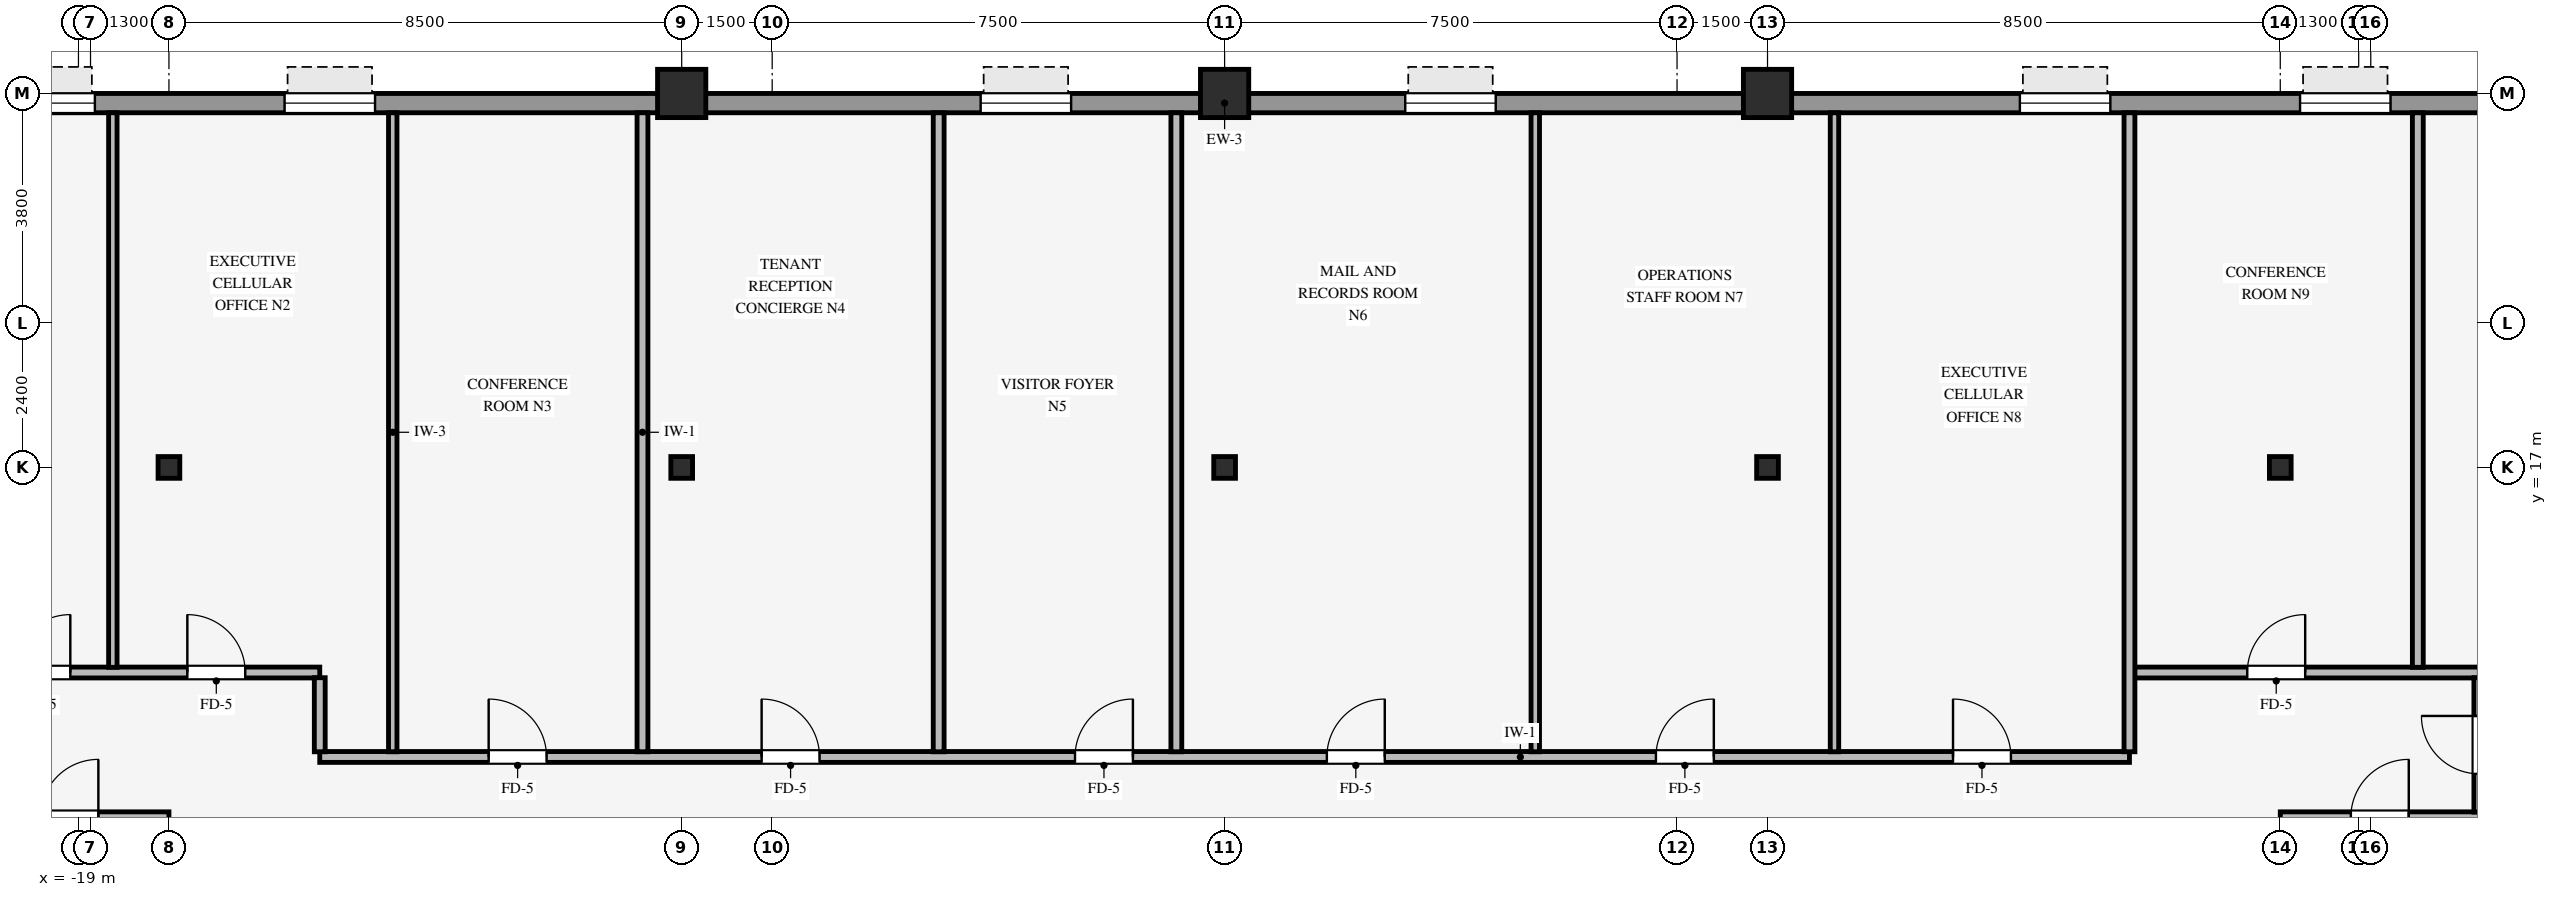
"""IFC4 building model, lengths in metres.
Left out: names, types, materials, properties, quantities, classifications, styles, units other than length and angle.
Written with IfcOpenShell. Run it as: python <this file> out.ifc"""

import sys

from ifc_helpers import new_model, si_unit, direction, frame, frame_2d, origin, origin_2d, place, context, subcontext, project, spatial, rectangle, hollow_rectangle, i_section, extrude, source, transform, mapped, element, fill, save


model = new_model("IFC4")
c1 = context("Model", 3, precision=1e-05, world=origin(), true_north=direction((0.0, 1.0)))
c2 = subcontext(c1, "Body", "Model", "MODEL_VIEW")
j1 = project(units=[si_unit("LENGTHUNIT", "METRE"), si_unit("PLANEANGLEUNIT", "RADIAN")], contexts=[c1])
p1 = place(None, origin())
s1 = spatial("IfcSite", under=j1, at=p1, CompositionType="ELEMENT")
p2 = place(p1, origin())
s2 = spatial("IfcBuilding", under=s1, at=p2, CompositionType="ELEMENT")
p3 = place(p2, frame((0.0, 0.0, 89.65)))
s3 = spatial("IfcBuildingStorey", under=s2, at=p3, CompositionType="ELEMENT", Elevation=89.65)
for number, where, z_axis, x_axis in (
    (1, (-9.0, 23.2, 0.0), (0.0, 0.0, 1.0), (1.0, 0.0, 0.0)),
    (2, (0.0, 23.2, 0.0), (0.0, 0.0, 1.0), (1.0, 0.0, 0.0)),
    (3, (9.0, 23.2, 0.0), (0.0, 0.0, 1.0), (1.0, 0.0, 0.0)),
):
    element("IfcColumn", number, at=place(p3, frame(where, z_axis=z_axis, x_axis=x_axis)), inside=s3, PredefinedType="COLUMN", context=c2, shape_type="SweptSolid", body=[
        extrude(hollow_rectangle(XDim=0.8, YDim=0.8, WallThickness=0.055, InnerFilletRadius=0.055, OuterFilletRadius=0.11, at=origin_2d()), origin(), (0.0, 0.0, 1.0), 3.25),
    ])
for number, where, z_axis, x_axis in (
    (4, (0.0, 17.0, 0.0), (0.0, 0.0, 1.0), (1.0, 0.0, 0.0)),
    (5, (-17.5, 17.0, 0.0), (0.0, 0.0, 1.0), (1.0, 0.0, 0.0)),
    (6, (-9.0, 17.0, 0.0), (0.0, 0.0, 1.0), (1.0, 0.0, 0.0)),
    (7, (9.0, 17.0, 0.0), (0.0, 0.0, 1.0), (1.0, 0.0, 0.0)),
    (8, (17.5, 17.0, 0.0), (0.0, 0.0, 1.0), (1.0, 0.0, 0.0)),
):
    element("IfcColumn", number, at=place(p3, frame(where, z_axis=z_axis, x_axis=x_axis)), inside=s3, PredefinedType="COLUMN", context=c2, shape_type="SweptSolid", body=[
        extrude(i_section(OverallWidth=0.36, OverallDepth=0.36, WebThickness=0.021, FlangeThickness=0.021, FilletRadius=0.018, at=origin_2d()), origin(), (0.0, 0.0, 1.0), 3.25),
    ])
p4 = place(p3, frame((-21.9, 23.04, 0.0), z_axis=(0.0, 0.0, 1.0), x_axis=(1.0, 0.0, 0.0)))
e9 = element("IfcWall", 9, at=p4, inside=s3, PredefinedType="STANDARD", context=c2, shape_type="SweptSolid", body=[
    extrude(rectangle(XDim=43.8, YDim=0.32, at=frame_2d((21.9, 0.0))), origin(), (0.0, 0.0, 1.0), 2.585),
])
p5 = place(p4, frame((1.672, 0.0, 0.8)))
e10 = element("IfcOpeningElement", 10, at=p5, cuts=e9, PredefinedType="OPENING", context=c2, shape_type="SweptSolid", body=[
    extrude(rectangle(XDim=1.5, YDim=1.6, at=frame_2d((0.75, 0.8))), frame((0.0, 0.17, 0.0), z_axis=(0.0, -1.0, 0.0), x_axis=(1.0, 0.0, 0.0)), (0.0, 0.0, 1.0), 0.34),
])
p6 = place(p4, frame((6.317, 0.0, 0.8)))
e11 = element("IfcOpeningElement", 11, at=p6, cuts=e9, PredefinedType="OPENING", context=c2, shape_type="SweptSolid", body=[
    extrude(rectangle(XDim=1.5, YDim=1.6, at=frame_2d((0.75, 0.8))), frame((0.0, 0.17, 0.0), z_axis=(0.0, -1.0, 0.0), x_axis=(1.0, 0.0, 0.0)), (0.0, 0.0, 1.0), 0.34),
])
p7 = place(p4, frame((17.856, 0.0, 0.8)))
e12 = element("IfcOpeningElement", 12, at=p7, cuts=e9, PredefinedType="OPENING", context=c2, shape_type="SweptSolid", body=[
    extrude(rectangle(XDim=1.5, YDim=1.6, at=frame_2d((0.75, 0.8))), frame((0.0, 0.17, 0.0), z_axis=(0.0, -1.0, 0.0), x_axis=(1.0, 0.0, 0.0)), (0.0, 0.0, 1.0), 0.34),
])
p8 = place(p4, frame((24.894, 0.0, 0.8)))
e13 = element("IfcOpeningElement", 13, at=p8, cuts=e9, PredefinedType="OPENING", context=c2, shape_type="SweptSolid", body=[
    extrude(rectangle(XDim=1.5, YDim=1.6, at=frame_2d((0.75, 0.8))), frame((0.0, 0.17, 0.0), z_axis=(0.0, -1.0, 0.0), x_axis=(1.0, 0.0, 0.0)), (0.0, 0.0, 1.0), 0.34),
])
p9 = place(p4, frame((35.083, 0.0, 0.8)))
e14 = element("IfcOpeningElement", 14, at=p9, cuts=e9, PredefinedType="OPENING", context=c2, shape_type="SweptSolid", body=[
    extrude(rectangle(XDim=1.5, YDim=1.6, at=frame_2d((0.75, 0.8))), frame((0.0, 0.17, 0.0), z_axis=(0.0, -1.0, 0.0), x_axis=(1.0, 0.0, 0.0)), (0.0, 0.0, 1.0), 0.34),
])
p10 = place(p4, frame((39.728, 0.0, 0.8)))
e15 = element("IfcOpeningElement", 15, at=p10, cuts=e9, PredefinedType="OPENING", context=c2, shape_type="SweptSolid", body=[
    extrude(rectangle(XDim=1.5, YDim=1.6, at=frame_2d((0.75, 0.8))), frame((0.0, 0.17, 0.0), z_axis=(0.0, -1.0, 0.0), x_axis=(1.0, 0.0, 0.0)), (0.0, 0.0, 1.0), 0.34),
])
p11 = place(p3, frame((-23.68, 11.2, 0.0), z_axis=(0.0, 0.0, 1.0), x_axis=(1.0, 0.0, 0.0)))
e16 = element("IfcWall", 16, at=p11, inside=s3, PredefinedType="PARTITIONING", context=c2, shape_type="SweptSolid", body=[
    extrude(rectangle(XDim=6.18, YDim=0.18, at=frame_2d((3.09, 0.0))), origin(), (0.0, 0.0, 1.0), 3.24),
])
p12 = place(p11, frame((4.05, 0.0, 0.0)))
e17 = element("IfcOpeningElement", 17, at=p12, cuts=e16, PredefinedType="OPENING", context=c2, shape_type="SweptSolid", body=[
    extrude(rectangle(XDim=0.96, YDim=2.1, at=frame_2d((0.48, 1.05))), frame((0.0, 0.1, 0.0), z_axis=(0.0, -1.0, 0.0), x_axis=(1.0, 0.0, 0.0)), (0.0, 0.0, 1.0), 0.2),
])
p13 = place(p3, frame((17.5, 11.2, 0.0), z_axis=(0.0, 0.0, 1.0), x_axis=(1.0, 0.0, 0.0)))
e18 = element("IfcWall", 18, at=p13, inside=s3, PredefinedType="PARTITIONING", context=c2, shape_type="SweptSolid", body=[
    extrude(rectangle(XDim=6.18, YDim=0.18, at=frame_2d((3.09, 0.0))), origin(), (0.0, 0.0, 1.0), 3.24),
])
p14 = place(p13, frame((1.17, 0.0, 0.0)))
e19 = element("IfcOpeningElement", 19, at=p14, cuts=e18, PredefinedType="OPENING", context=c2, shape_type="SweptSolid", body=[
    extrude(rectangle(XDim=0.96, YDim=2.1, at=frame_2d((0.48, 1.05))), frame((0.0, 0.1, 0.0), z_axis=(0.0, -1.0, 0.0), x_axis=(1.0, 0.0, 0.0)), (0.0, 0.0, 1.0), 0.2),
])
p15 = place(p3, frame((-15.0, 12.2, 0.0), z_axis=(0.0, 0.0, 1.0), x_axis=(1.0, 0.0, 0.0)))
e20 = element("IfcWall", 20, at=p15, inside=s3, PredefinedType="PARTITIONING", context=c2, shape_type="SweptSolid", body=[
    extrude(rectangle(XDim=30.0, YDim=0.18, at=frame_2d((15.0, 0.0))), origin(), (0.0, 0.0, 1.0), 3.24),
])
p16 = place(p15, frame((16.695, 0.0, 0.0)))
e21 = element("IfcOpeningElement", 21, at=p16, cuts=e20, PredefinedType="OPENING", context=c2, shape_type="SweptSolid", body=[
    extrude(rectangle(XDim=0.96, YDim=2.1, at=frame_2d((0.48, 1.05))), frame((0.0, 0.1, 0.0), z_axis=(0.0, -1.0, 0.0), x_axis=(1.0, 0.0, 0.0)), (0.0, 0.0, 1.0), 0.2),
])
p17 = place(p15, frame((22.15, 0.0, 0.0)))
e22 = element("IfcOpeningElement", 22, at=p17, cuts=e20, PredefinedType="OPENING", context=c2, shape_type="SweptSolid", body=[
    extrude(rectangle(XDim=0.96, YDim=2.1, at=frame_2d((0.48, 1.05))), frame((0.0, 0.1, 0.0), z_axis=(0.0, -1.0, 0.0), x_axis=(1.0, 0.0, 0.0)), (0.0, 0.0, 1.0), 0.2),
])
p18 = place(p15, frame((7.325, 0.0, 0.0)))
e23 = element("IfcOpeningElement", 23, at=p18, cuts=e20, PredefinedType="OPENING", context=c2, shape_type="SweptSolid", body=[
    extrude(rectangle(XDim=0.96, YDim=2.1, at=frame_2d((0.48, 1.05))), frame((0.0, 0.1, 0.0), z_axis=(0.0, -1.0, 0.0), x_axis=(1.0, 0.0, 0.0)), (0.0, 0.0, 1.0), 0.2),
])
p19 = place(p15, frame((27.075, 0.0, 0.0)))
e24 = element("IfcOpeningElement", 24, at=p19, cuts=e20, PredefinedType="OPENING", context=c2, shape_type="SweptSolid", body=[
    extrude(rectangle(XDim=0.96, YDim=2.1, at=frame_2d((0.48, 1.05))), frame((0.0, 0.1, 0.0), z_axis=(0.0, -1.0, 0.0), x_axis=(1.0, 0.0, 0.0)), (0.0, 0.0, 1.0), 0.2),
])
p20 = place(p15, frame((2.8, 0.0, 0.0)))
e25 = element("IfcOpeningElement", 25, at=p20, cuts=e20, PredefinedType="OPENING", context=c2, shape_type="SweptSolid", body=[
    extrude(rectangle(XDim=0.96, YDim=2.1, at=frame_2d((0.48, 1.05))), frame((0.0, 0.1, 0.0), z_axis=(0.0, -1.0, 0.0), x_axis=(1.0, 0.0, 0.0)), (0.0, 0.0, 1.0), 0.2),
])
p21 = place(p15, frame((12.52, 0.0, 0.0)))
e26 = element("IfcOpeningElement", 26, at=p21, cuts=e20, PredefinedType="OPENING", context=c2, shape_type="SweptSolid", body=[
    extrude(rectangle(XDim=0.96, YDim=2.1, at=frame_2d((0.48, 1.05))), frame((0.0, 0.1, 0.0), z_axis=(0.0, -1.0, 0.0), x_axis=(1.0, 0.0, 0.0)), (0.0, 0.0, 1.0), 0.2),
])
p22 = place(p3, frame((-20.8, 13.6, 0.0), z_axis=(0.0, 0.0, 1.0), x_axis=(1.0, 0.0, 0.0)))
e27 = element("IfcWall", 27, at=p22, inside=s3, PredefinedType="PARTITIONING", context=c2, shape_type="SweptSolid", body=[
    extrude(rectangle(XDim=5.8, YDim=0.18, at=frame_2d((2.9, 0.0))), origin(), (0.0, 0.0, 1.0), 2.878),
])
p23 = place(p22, frame((3.605, 0.0, 0.0)))
e28 = element("IfcOpeningElement", 28, at=p23, cuts=e27, PredefinedType="OPENING", context=c2, shape_type="SweptSolid", body=[
    extrude(rectangle(XDim=0.96, YDim=2.1, at=frame_2d((0.48, 1.05))), frame((0.0, 0.1, 0.0), z_axis=(0.0, -1.0, 0.0), x_axis=(1.0, 0.0, 0.0)), (0.0, 0.0, 1.0), 0.2),
])
p24 = place(p22, frame((0.705, 0.0, 0.0)))
e29 = element("IfcOpeningElement", 29, at=p24, cuts=e27, PredefinedType="OPENING", context=c2, shape_type="SweptSolid", body=[
    extrude(rectangle(XDim=0.96, YDim=2.1, at=frame_2d((0.48, 1.05))), frame((0.0, 0.1, 0.0), z_axis=(0.0, -1.0, 0.0), x_axis=(1.0, 0.0, 0.0)), (0.0, 0.0, 1.0), 0.2),
])
p25 = place(p3, frame((15.086, 13.6, 0.0), z_axis=(0.0, 0.0, 1.0), x_axis=(1.0, 0.0, 0.0)))
e30 = element("IfcWall", 30, at=p25, inside=s3, PredefinedType="PARTITIONING", context=c2, shape_type="SweptSolid", body=[
    extrude(rectangle(XDim=5.714, YDim=0.18, at=frame_2d((2.857, 0.0))), origin(), (0.0, 0.0, 1.0), 2.878),
])
p26 = place(p25, frame((1.867, 0.0, 0.0)))
e31 = element("IfcOpeningElement", 31, at=p26, cuts=e30, PredefinedType="OPENING", context=c2, shape_type="SweptSolid", body=[
    extrude(rectangle(XDim=0.96, YDim=2.1, at=frame_2d((0.48, 1.05))), frame((0.0, 0.1, 0.0), z_axis=(0.0, -1.0, 0.0), x_axis=(1.0, 0.0, 0.0)), (0.0, 0.0, 1.0), 0.2),
])
p27 = place(p3, frame((-18.43, 13.686, 0.0), z_axis=(0.0, 0.0, 1.0), x_axis=(0.0, 1.0, 0.0)))
e32 = element("IfcWall", 32, at=p27, inside=s3, PredefinedType="PARTITIONING", context=c2, shape_type="SweptSolid", body=[
    extrude(rectangle(XDim=9.194, YDim=0.14, at=frame_2d((4.597, 0.0))), origin(), (0.0, 0.0, 1.0), 3.24),
])
p28 = place(p3, frame((-15.0, 12.286, 0.0), z_axis=(0.0, 0.0, 1.0), x_axis=(0.0, 1.0, 0.0)))
e33 = element("IfcWall", 33, at=p28, inside=s3, PredefinedType="PARTITIONING", context=c2, shape_type="SweptSolid", body=[
    extrude(rectangle(XDim=1.228, YDim=0.18, at=frame_2d((0.614, 0.0))), origin(), (0.0, 0.0, 1.0), 3.24),
])
p29 = place(p3, frame((-13.79, 12.286, 0.0), z_axis=(0.0, 0.0, 1.0), x_axis=(0.0, 1.0, 0.0)))
e34 = element("IfcWall", 34, at=p29, inside=s3, PredefinedType="PARTITIONING", context=c2, shape_type="SweptSolid", body=[
    extrude(rectangle(XDim=10.594, YDim=0.14, at=frame_2d((5.297, 0.0))), origin(), (0.0, 0.0, 1.0), 3.24),
])
for number, where, z_axis, x_axis in (
    (35, (-9.65, 12.286, 0.0), (0.0, 0.0, 1.0), (0.0, 1.0, 0.0)),
    (36, (-4.74, 12.286, 0.0), (0.0, 0.0, 1.0), (0.0, 1.0, 0.0)),
    (37, (-0.8, 12.286, 0.0), (0.0, 0.0, 1.0), (0.0, 1.0, 0.0)),
):
    element("IfcWall", number, at=place(p3, frame(where, z_axis=z_axis, x_axis=x_axis)), inside=s3, PredefinedType="PARTITIONING", context=c2, shape_type="SweptSolid", body=[
        extrude(rectangle(XDim=10.594, YDim=0.18, at=frame_2d((5.297, 0.0))), origin(), (0.0, 0.0, 1.0), 3.24),
    ])
for number, where, z_axis, x_axis in (
    (38, (5.15, 12.286, 0.0), (0.0, 0.0, 1.0), (0.0, 1.0, 0.0)),
    (39, (10.11, 12.286, 0.0), (0.0, 0.0, 1.0), (0.0, 1.0, 0.0)),
):
    element("IfcWall", number, at=place(p3, frame(where, z_axis=z_axis, x_axis=x_axis)), inside=s3, PredefinedType="PARTITIONING", context=c2, shape_type="SweptSolid", body=[
        extrude(rectangle(XDim=10.594, YDim=0.14, at=frame_2d((5.297, 0.0))), origin(), (0.0, 0.0, 1.0), 3.24),
    ])
p30 = place(p3, frame((15.0, 12.286, 0.0), z_axis=(0.0, 0.0, 1.0), x_axis=(0.0, 1.0, 0.0)))
e40 = element("IfcWall", 40, at=p30, inside=s3, PredefinedType="PARTITIONING", context=c2, shape_type="SweptSolid", body=[
    extrude(rectangle(XDim=10.594, YDim=0.18, at=frame_2d((5.297, 0.0))), origin(), (0.0, 0.0, 1.0), 3.24),
])
p31 = place(p3, frame((19.78, 13.686, 0.0), z_axis=(0.0, 0.0, 1.0), x_axis=(0.0, 1.0, 0.0)))
e41 = element("IfcWall", 41, at=p31, inside=s3, PredefinedType="PARTITIONING", context=c2, shape_type="SweptSolid", body=[
    extrude(rectangle(XDim=9.194, YDim=0.18, at=frame_2d((4.597, 0.0))), origin(), (0.0, 0.0, 1.0), 3.24),
])
p32 = place(p3, frame((20.8, 11.286, 0.0), z_axis=(0.0, 0.0, 1.0), x_axis=(0.0, 1.0, 0.0)))
e42 = element("IfcWall", 42, at=p32, inside=s3, PredefinedType="PARTITIONING", context=c2, shape_type="SweptSolid", body=[
    extrude(rectangle(XDim=2.228, YDim=0.18, at=frame_2d((1.114, 0.0))), origin(), (0.0, 0.0, 1.0), 3.24),
])
p33 = place(p32, frame((0.634, 0.0, 0.0)))
e43 = element("IfcOpeningElement", 43, at=p33, cuts=e42, PredefinedType="OPENING", context=c2, shape_type="SweptSolid", body=[
    extrude(rectangle(XDim=0.96, YDim=2.1, at=frame_2d((0.48, 1.05))), frame((0.0, 0.1, 0.0), z_axis=(0.0, -1.0, 0.0), x_axis=(1.0, 0.0, 0.0)), (0.0, 0.0, 1.0), 0.2),
])
m1 = source(origin(), c2, "Body", "SweptSolid", [
    extrude(rectangle(XDim=1.5, YDim=1.6, at=frame_2d((0.75, 0.8))), frame((0.0, 0.03, 0.0), z_axis=(0.0, -1.0, 0.0), x_axis=(1.0, 0.0, 0.0)), (0.0, 0.0, 1.0), 0.06),
])
p34 = place(p5, origin())
e44 = element("IfcWindow", 44, at=p34, inside=s3, PartitioningType="SINGLE_PANEL", PredefinedType="WINDOW", context=c2, shape_type="MappedRepresentation", body=[
    mapped(m1, transform((0.0, 0.0, 0.0), scale=1.0)),
])
fill(e10, e44)
p35 = place(p6, origin())
e45 = element("IfcWindow", 45, at=p35, inside=s3, PartitioningType="SINGLE_PANEL", PredefinedType="WINDOW", context=c2, shape_type="MappedRepresentation", body=[
    mapped(m1, transform((0.0, 0.0, 0.0), scale=1.0)),
])
fill(e11, e45)
p36 = place(p7, origin())
e46 = element("IfcWindow", 46, at=p36, inside=s3, PartitioningType="SINGLE_PANEL", PredefinedType="WINDOW", context=c2, shape_type="MappedRepresentation", body=[
    mapped(m1, transform((0.0, 0.0, 0.0), scale=1.0)),
])
fill(e12, e46)
p37 = place(p8, origin())
e47 = element("IfcWindow", 47, at=p37, inside=s3, PartitioningType="SINGLE_PANEL", PredefinedType="WINDOW", context=c2, shape_type="MappedRepresentation", body=[
    mapped(m1, transform((0.0, 0.0, 0.0), scale=1.0)),
])
fill(e13, e47)
p38 = place(p9, origin())
e48 = element("IfcWindow", 48, at=p38, inside=s3, PartitioningType="SINGLE_PANEL", PredefinedType="WINDOW", context=c2, shape_type="MappedRepresentation", body=[
    mapped(m1, transform((0.0, 0.0, 0.0), scale=1.0)),
])
fill(e14, e48)
p39 = place(p10, origin())
e49 = element("IfcWindow", 49, at=p39, inside=s3, PartitioningType="SINGLE_PANEL", PredefinedType="WINDOW", context=c2, shape_type="MappedRepresentation", body=[
    mapped(m1, transform((0.0, 0.0, 0.0), scale=1.0)),
])
fill(e15, e49)
m2 = source(origin(), c2, "Body", "SweptSolid", [
    extrude(rectangle(XDim=0.96, YDim=2.1, at=frame_2d((0.48, 1.05))), frame((0.0, 0.025, 0.0), z_axis=(0.0, -1.0, 0.0), x_axis=(1.0, 0.0, 0.0)), (0.0, 0.0, 1.0), 0.05),
])
p40 = place(p16, origin())
e50 = element("IfcDoor", 50, at=p40, inside=s3, OperationType="SINGLE_SWING_RIGHT", PredefinedType="DOOR", context=c2, shape_type="MappedRepresentation", body=[
    mapped(m2, transform((0.0, 0.0, 0.0), scale=1.0)),
])
fill(e21, e50)
p41 = place(p17, origin())
e51 = element("IfcDoor", 51, at=p41, inside=s3, OperationType="SINGLE_SWING_RIGHT", PredefinedType="DOOR", context=c2, shape_type="MappedRepresentation", body=[
    mapped(m2, transform((0.0, 0.0, 0.0), scale=1.0)),
])
fill(e22, e51)
p42 = place(p18, origin())
e52 = element("IfcDoor", 52, at=p42, inside=s3, OperationType="SINGLE_SWING_LEFT", PredefinedType="DOOR", context=c2, shape_type="MappedRepresentation", body=[
    mapped(m2, transform((0.0, 0.0, 0.0), scale=1.0)),
])
fill(e23, e52)
p43 = place(p19, origin())
e53 = element("IfcDoor", 53, at=p43, inside=s3, OperationType="SINGLE_SWING_LEFT", PredefinedType="DOOR", context=c2, shape_type="MappedRepresentation", body=[
    mapped(m2, transform((0.0, 0.0, 0.0), scale=1.0)),
])
fill(e24, e53)
p44 = place(p26, origin())
e54 = element("IfcDoor", 54, at=p44, inside=s3, OperationType="SINGLE_SWING_RIGHT", PredefinedType="DOOR", context=c2, shape_type="MappedRepresentation", body=[
    mapped(m2, transform((0.0, 0.0, 0.0), scale=1.0)),
])
fill(e31, e54)
p45 = place(p20, origin())
e55 = element("IfcDoor", 55, at=p45, inside=s3, OperationType="SINGLE_SWING_LEFT", PredefinedType="DOOR", context=c2, shape_type="MappedRepresentation", body=[
    mapped(m2, transform((0.0, 0.0, 0.0), scale=1.0)),
])
fill(e25, e55)
p46 = place(p23, origin())
e56 = element("IfcDoor", 56, at=p46, inside=s3, OperationType="SINGLE_SWING_LEFT", PredefinedType="DOOR", context=c2, shape_type="MappedRepresentation", body=[
    mapped(m2, transform((0.0, 0.0, 0.0), scale=1.0)),
])
fill(e28, e56)
p47 = place(p12, origin())
e57 = element("IfcDoor", 57, at=p47, inside=s3, OperationType="SINGLE_SWING_RIGHT", PredefinedType="DOOR", context=c2, shape_type="MappedRepresentation", body=[
    mapped(m2, transform((0.0, 0.0, 0.0), scale=1.0)),
])
fill(e17, e57)
p48 = place(p14, origin())
e58 = element("IfcDoor", 58, at=p48, inside=s3, OperationType="SINGLE_SWING_RIGHT", PredefinedType="DOOR", context=c2, shape_type="MappedRepresentation", body=[
    mapped(m2, transform((0.0, 0.0, 0.0), scale=1.0)),
])
fill(e19, e58)
p49 = place(p21, origin())
e59 = element("IfcDoor", 59, at=p49, inside=s3, OperationType="SINGLE_SWING_RIGHT", PredefinedType="DOOR", context=c2, shape_type="MappedRepresentation", body=[
    mapped(m2, transform((0.0, 0.0, 0.0), scale=1.0)),
])
fill(e26, e59)
p50 = place(p24, origin())
e60 = element("IfcDoor", 60, at=p50, inside=s3, OperationType="SINGLE_SWING_RIGHT", PredefinedType="DOOR", context=c2, shape_type="MappedRepresentation", body=[
    mapped(m2, transform((0.0, 0.0, 0.0), scale=1.0)),
])
fill(e29, e60)
p51 = place(p33, origin())
e61 = element("IfcDoor", 61, at=p51, inside=s3, OperationType="SINGLE_SWING_RIGHT", PredefinedType="DOOR", context=c2, shape_type="MappedRepresentation", body=[
    mapped(m2, transform((0.0, 0.0, 0.0), scale=1.0)),
])
fill(e43, e61)
save(model, sys.argv[1])
